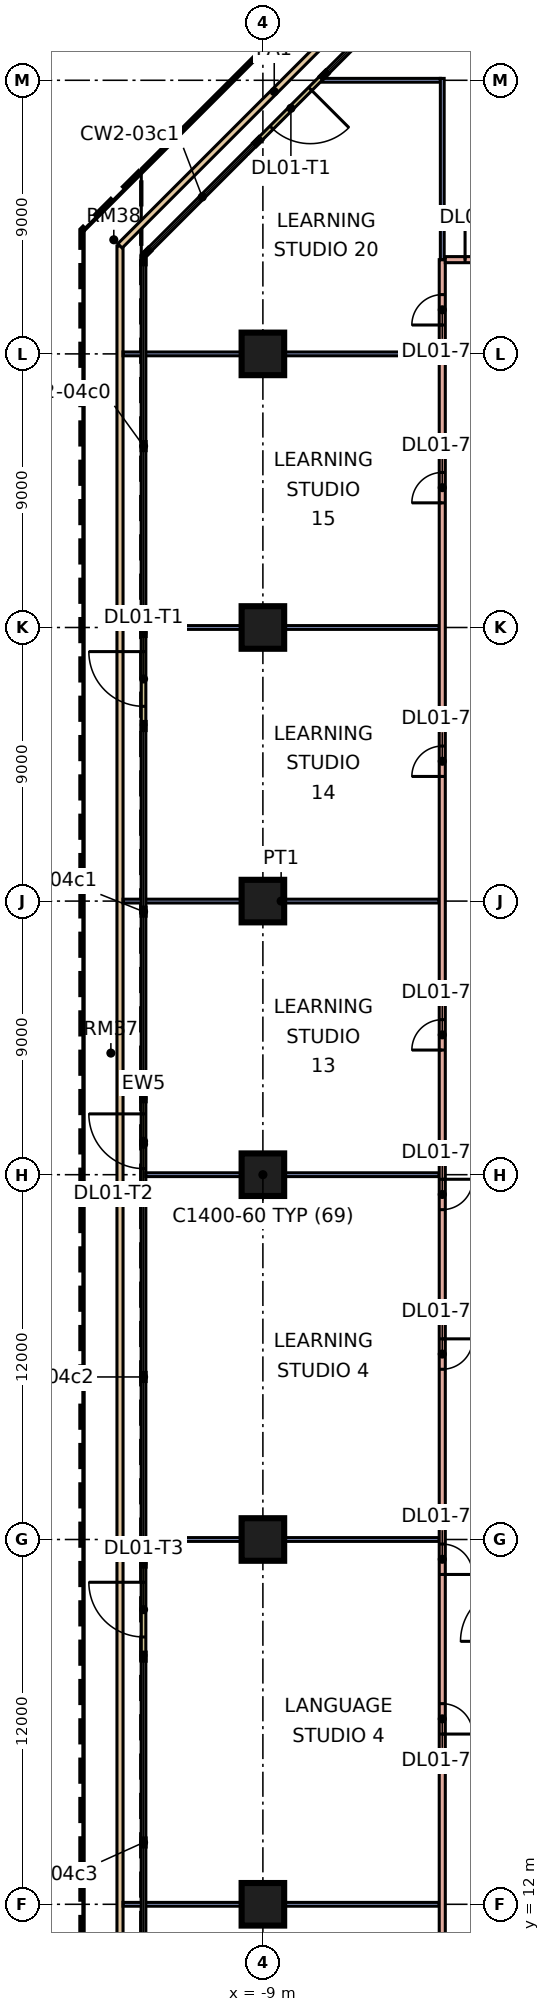
"""IFC4 building model, lengths in metres.
Left out: names, types, materials, properties, quantities, classifications, styles, units other than length and angle.
Written with IfcOpenShell. Run it as: python <this file> out.ifc"""

import sys

from ifc_helpers import new_model, si_unit, direction, frame, frame_2d, origin, origin_2d, place, context, subcontext, project, spatial, rectangle, extrude, element, fill, save


model = new_model("IFC4")
c1 = context("Model", 3, precision=1e-05, world=origin(), true_north=direction((0.0, 1.0)))
c2 = subcontext(c1, "Body", "Model", "MODEL_VIEW")
j1 = project(units=[si_unit("LENGTHUNIT", "METRE"), si_unit("PLANEANGLEUNIT", "RADIAN")], contexts=[c1])
p1 = place(None, origin())
s1 = spatial("IfcSite", under=j1, at=p1, CompositionType="ELEMENT")
p2 = place(p1, origin())
s2 = spatial("IfcBuilding", under=s1, at=p2, CompositionType="ELEMENT")
p3 = place(p2, frame((0.0, 0.0, 7.2)))
s3 = spatial("IfcBuildingStorey", under=s2, at=p3, CompositionType="ELEMENT", Elevation=7.2)
for number, where, z_axis, x_axis in (
    (1, (-9.0, 12.0, 0.0), (0.0, 0.0, 1.0), (1.0, 0.0, 0.0)),
    (2, (-9.0, 24.0, 0.0), (0.0, 0.0, 1.0), (1.0, 0.0, 0.0)),
    (3, (-9.0, 36.0, 0.0), (0.0, 0.0, 1.0), (1.0, 0.0, 0.0)),
    (4, (-9.0, 45.0, 0.0), (0.0, 0.0, 1.0), (1.0, 0.0, 0.0)),
    (5, (-9.0, 54.0, 0.0), (0.0, 0.0, 1.0), (1.0, 0.0, 0.0)),
    (6, (-9.0, 63.0, 0.0), (0.0, 0.0, 1.0), (1.0, 0.0, 0.0)),
):
    element("IfcColumn", number, at=place(p3, frame(where, z_axis=z_axis, x_axis=x_axis)), inside=s3, PredefinedType="COLUMN", context=c2, shape_type="SweptSolid", body=[
        extrude(rectangle(XDim=1.4, YDim=1.4, at=origin_2d()), origin(), (0.0, 0.0, 1.0), 4.8),
    ])
p4 = place(p3, frame((-7.018, 72.139, 0.0), z_axis=(0.0, 0.0, 1.0), x_axis=(-0.707106781187, -0.707106781187, 0.0)))
e7 = element("IfcWall", 7, at=p4, inside=s3, PredefinedType="SOLIDWALL", context=c2, shape_type="SweptSolid", body=[
    extrude(rectangle(XDim=3.0, YDim=0.15, at=frame_2d((1.5, 0.0))), origin(), (0.0, 0.0, 1.0), 4.4),
])
p5 = place(p4, frame((0.6, 0.0, 0.0)))
e8 = element("IfcOpeningElement", 8, at=p5, cuts=e7, PredefinedType="OPENING", context=c2, shape_type="SweptSolid", body=[
    extrude(rectangle(XDim=1.8, YDim=2.4, at=frame_2d((0.9, 1.2))), frame((0.0, 0.085, 0.0), z_axis=(0.0, -1.0, 0.0), x_axis=(1.0, 0.0, 0.0)), (0.0, 0.0, 1.0), 0.17),
])
p6 = place(p3, frame((-12.925, 53.807, 0.0), z_axis=(0.0, 0.0, 1.0), x_axis=(0.0, -1.0, 0.0)))
e9 = element("IfcWall", 9, at=p6, inside=s3, PredefinedType="SOLIDWALL", context=c2, shape_type="SweptSolid", body=[
    extrude(rectangle(XDim=3.0, YDim=0.15, at=frame_2d((1.5, 0.0))), origin(), (0.0, 0.0, 1.0), 4.4),
])
p7 = place(p6, frame((0.6, 0.0, 0.0)))
e10 = element("IfcOpeningElement", 10, at=p7, cuts=e9, PredefinedType="OPENING", context=c2, shape_type="SweptSolid", body=[
    extrude(rectangle(XDim=1.8, YDim=2.4, at=frame_2d((0.9, 1.2))), frame((0.0, 0.085, 0.0), z_axis=(0.0, -1.0, 0.0), x_axis=(1.0, 0.0, 0.0)), (0.0, 0.0, 1.0), 0.17),
])
p8 = place(p3, frame((-12.925, 38.5, 0.0), z_axis=(0.0, 0.0, 1.0), x_axis=(0.0, -1.0, 0.0)))
e11 = element("IfcWall", 11, at=p8, inside=s3, PredefinedType="SOLIDWALL", context=c2, shape_type="SweptSolid", body=[
    extrude(rectangle(XDim=3.0, YDim=0.15, at=frame_2d((1.5, 0.0))), origin(), (0.0, 0.0, 1.0), 4.4),
])
p9 = place(p8, frame((0.5, 0.0, 0.0)))
e12 = element("IfcOpeningElement", 12, at=p9, cuts=e11, PredefinedType="OPENING", context=c2, shape_type="SweptSolid", body=[
    extrude(rectangle(XDim=1.8, YDim=2.4, at=frame_2d((0.9, 1.2))), frame((0.0, 0.085, 0.0), z_axis=(0.0, -1.0, 0.0), x_axis=(1.0, 0.0, 0.0)), (0.0, 0.0, 1.0), 0.17),
])
p10 = place(p3, frame((-12.925, 23.193, 0.0), z_axis=(0.0, 0.0, 1.0), x_axis=(0.0, -1.0, 0.0)))
e13 = element("IfcWall", 13, at=p10, inside=s3, PredefinedType="SOLIDWALL", context=c2, shape_type="SweptSolid", body=[
    extrude(rectangle(XDim=3.0, YDim=0.15, at=frame_2d((1.5, 0.0))), origin(), (0.0, 0.0, 1.0), 4.4),
])
p11 = place(p10, frame((0.6, 0.0, 0.0)))
e14 = element("IfcOpeningElement", 14, at=p11, cuts=e13, PredefinedType="OPENING", context=c2, shape_type="SweptSolid", body=[
    extrude(rectangle(XDim=1.8, YDim=2.4, at=frame_2d((0.9, 1.2))), frame((0.0, 0.085, 0.0), z_axis=(0.0, -1.0, 0.0), x_axis=(1.0, 0.0, 0.0)), (0.0, 0.0, 1.0), 0.17),
])
p12 = place(p3, frame((-13.7, 7.447, 0.0), z_axis=(0.0, 0.0, 1.0), x_axis=(0.0, 1.0, 0.0)))
e15 = element("IfcWall", 15, at=p12, inside=s3, PredefinedType="PARAPET", context=c2, shape_type="SweptSolid", body=[
    extrude(rectangle(XDim=59.107, YDim=0.2, at=frame_2d((29.553, 0.0))), origin(), (0.0, 0.0, 1.0), 0.5),
])
p13 = place(p3, frame((-13.7, 66.553, 0.0), z_axis=(0.0, 0.0, 1.0), x_axis=(0.707106781187, 0.707106781187, 0.0)))
e16 = element("IfcWall", 16, at=p13, inside=s3, PredefinedType="PARAPET", context=c2, shape_type="SweptSolid", body=[
    extrude(rectangle(XDim=14.349, YDim=0.2, at=frame_2d((7.175, 0.0))), origin(), (0.0, 0.0, 1.0), 0.5),
])
for number, where, z_axis, x_axis in (
    (17, (-13.6, 12.0, 0.0), (0.0, 0.0, 1.0), (1.0, 0.0, 0.0)),
    (18, (-13.6, 24.0, 0.0), (0.0, 0.0, 1.0), (1.0, 0.0, 0.0)),
    (19, (-13.6, 45.0, 0.0), (0.0, 0.0, 1.0), (1.0, 0.0, 0.0)),
):
    element("IfcWall", number, at=place(p3, frame(where, z_axis=z_axis, x_axis=x_axis)), inside=s3, PredefinedType="PARTITIONING", context=c2, shape_type="SweptSolid", body=[
        extrude(rectangle(XDim=10.4, YDim=0.125, at=frame_2d((5.2, 0.0))), origin(), (0.0, 0.0, 1.0), 4.4),
    ])
p14 = place(p3, frame((-12.925, 54.0, 0.0), z_axis=(0.0, 0.0, 1.0), x_axis=(1.0, 0.0, 0.0)))
e20 = element("IfcWall", 20, at=p14, inside=s3, PredefinedType="PARTITIONING", context=c2, shape_type="SweptSolid", body=[
    extrude(rectangle(XDim=9.725, YDim=0.125, at=frame_2d((4.863, 0.0))), origin(), (0.0, 0.0, 1.0), 4.4),
])
p15 = place(p3, frame((-13.6, 63.0, 0.0), z_axis=(0.0, 0.0, 1.0), x_axis=(1.0, 0.0, 0.0)))
e21 = element("IfcWall", 21, at=p15, inside=s3, PredefinedType="PARTITIONING", context=c2, shape_type="SweptSolid", body=[
    extrude(rectangle(XDim=10.4, YDim=0.125, at=frame_2d((5.2, 0.0))), origin(), (0.0, 0.0, 1.0), 4.4),
])
p16 = place(p3, frame((-12.851, 36.0, 0.0), z_axis=(0.0, 0.0, 1.0), x_axis=(1.0, 0.0, 0.0)))
e22 = element("IfcWall", 22, at=p16, inside=s3, PredefinedType="PARTITIONING", context=c2, shape_type="SweptSolid", body=[
    extrude(rectangle(XDim=9.651, YDim=0.125, at=frame_2d((4.826, 0.0))), origin(), (0.0, 0.0, 1.0), 4.4),
])
p17 = place(p3, frame((-7.053, 72.0, 0.0), z_axis=(0.0, 0.0, 1.0), x_axis=(1.0, 0.0, 0.0)))
e23 = element("IfcWall", 23, at=p17, inside=s3, PredefinedType="PARTITIONING", context=c2, shape_type="SweptSolid", body=[
    extrude(rectangle(XDim=3.891, YDim=0.125, at=frame_2d((1.945, 0.0))), origin(), (0.0, 0.0, 1.0), 4.4),
])
p18 = place(p3, frame((-3.1, -1.953, 0.0), z_axis=(0.0, 0.0, 1.0), x_axis=(0.0, 1.0, 0.0)))
e24 = element("IfcWall", 24, at=p18, inside=s3, PredefinedType="PARTITIONING", context=c2, shape_type="SweptSolid", body=[
    extrude(rectangle(XDim=68.053, YDim=0.2, at=frame_2d((34.026, 0.0))), origin(), (0.0, 0.0, 1.0), 4.4),
])
p19 = place(p18, frame((7.553, 0.0, 0.0)))
e25 = element("IfcOpeningElement", 25, at=p19, cuts=e24, PredefinedType="OPENING", context=c2, shape_type="SweptSolid", body=[
    extrude(rectangle(XDim=1.0, YDim=2.1, at=frame_2d((0.5, 1.05))), frame((0.0, 0.11, 0.0), z_axis=(0.0, -1.0, 0.0), x_axis=(1.0, 0.0, 0.0)), (0.0, 0.0, 1.0), 0.22),
])
p20 = place(p18, frame((19.553, 0.0, 0.0)))
e26 = element("IfcOpeningElement", 26, at=p20, cuts=e24, PredefinedType="OPENING", context=c2, shape_type="SweptSolid", body=[
    extrude(rectangle(XDim=1.0, YDim=2.1, at=frame_2d((0.5, 1.05))), frame((0.0, 0.11, 0.0), z_axis=(0.0, -1.0, 0.0), x_axis=(1.0, 0.0, 0.0)), (0.0, 0.0, 1.0), 0.22),
])
p21 = place(p18, frame((24.803, 0.0, 0.0)))
e27 = element("IfcOpeningElement", 27, at=p21, cuts=e24, PredefinedType="OPENING", context=c2, shape_type="SweptSolid", body=[
    extrude(rectangle(XDim=1.0, YDim=2.1, at=frame_2d((0.5, 1.05))), frame((0.0, 0.11, 0.0), z_axis=(0.0, -1.0, 0.0), x_axis=(1.0, 0.0, 0.0)), (0.0, 0.0, 1.0), 0.22),
])
p22 = place(p18, frame((31.553, 0.0, 0.0)))
e28 = element("IfcOpeningElement", 28, at=p22, cuts=e24, PredefinedType="OPENING", context=c2, shape_type="SweptSolid", body=[
    extrude(rectangle(XDim=1.0, YDim=2.1, at=frame_2d((0.5, 1.05))), frame((0.0, 0.11, 0.0), z_axis=(0.0, -1.0, 0.0), x_axis=(1.0, 0.0, 0.0)), (0.0, 0.0, 1.0), 0.22),
])
p23 = place(p18, frame((36.803, 0.0, 0.0)))
e29 = element("IfcOpeningElement", 29, at=p23, cuts=e24, PredefinedType="OPENING", context=c2, shape_type="SweptSolid", body=[
    extrude(rectangle(XDim=1.0, YDim=2.1, at=frame_2d((0.5, 1.05))), frame((0.0, 0.11, 0.0), z_axis=(0.0, -1.0, 0.0), x_axis=(1.0, 0.0, 0.0)), (0.0, 0.0, 1.0), 0.22),
])
p24 = place(p18, frame((42.053, 0.0, 0.0)))
e30 = element("IfcOpeningElement", 30, at=p24, cuts=e24, PredefinedType="OPENING", context=c2, shape_type="SweptSolid", body=[
    extrude(rectangle(XDim=1.0, YDim=2.1, at=frame_2d((0.5, 1.05))), frame((0.0, 0.11, 0.0), z_axis=(0.0, -1.0, 0.0), x_axis=(1.0, 0.0, 0.0)), (0.0, 0.0, 1.0), 0.22),
])
p25 = place(p18, frame((51.053, 0.0, 0.0)))
e31 = element("IfcOpeningElement", 31, at=p25, cuts=e24, PredefinedType="OPENING", context=c2, shape_type="SweptSolid", body=[
    extrude(rectangle(XDim=1.0, YDim=2.1, at=frame_2d((0.5, 1.05))), frame((0.0, 0.11, 0.0), z_axis=(0.0, -1.0, 0.0), x_axis=(1.0, 0.0, 0.0)), (0.0, 0.0, 1.0), 0.22),
])
p26 = place(p18, frame((60.053, 0.0, 0.0)))
e32 = element("IfcOpeningElement", 32, at=p26, cuts=e24, PredefinedType="OPENING", context=c2, shape_type="SweptSolid", body=[
    extrude(rectangle(XDim=1.0, YDim=2.1, at=frame_2d((0.5, 1.05))), frame((0.0, 0.11, 0.0), z_axis=(0.0, -1.0, 0.0), x_axis=(1.0, 0.0, 0.0)), (0.0, 0.0, 1.0), 0.22),
])
p27 = place(p18, frame((65.903, 0.0, 0.0)))
e33 = element("IfcOpeningElement", 33, at=p27, cuts=e24, PredefinedType="OPENING", context=c2, shape_type="SweptSolid", body=[
    extrude(rectangle(XDim=1.0, YDim=2.1, at=frame_2d((0.5, 1.05))), frame((0.0, 0.11, 0.0), z_axis=(0.0, -1.0, 0.0), x_axis=(1.0, 0.0, 0.0)), (0.0, 0.0, 1.0), 0.22),
])
p28 = place(p3, frame((-3.1, 66.1, 0.0), z_axis=(0.0, 0.0, 1.0), x_axis=(0.0, 1.0, 0.0)))
e34 = element("IfcWall", 34, at=p28, inside=s3, PredefinedType="PARTITIONING", context=c2, shape_type="SweptSolid", body=[
    extrude(rectangle(XDim=5.962, YDim=0.125, at=frame_2d((2.981, 0.0))), origin(), (0.0, 0.0, 1.0), 4.4),
])
p29 = place(p3, frame((-3.0, 66.1, 0.0), z_axis=(0.0, 0.0, 1.0), x_axis=(1.0, 0.0, 0.0)))
e35 = element("IfcWall", 35, at=p29, inside=s3, PredefinedType="PARTITIONING", context=c2, shape_type="SweptSolid", body=[
    extrude(rectangle(XDim=30.0, YDim=0.2, at=frame_2d((15.0, 0.0))), origin(), (0.0, 0.0, 1.0), 4.4),
])
p30 = place(p29, frame((0.65, 0.0, 0.0)))
e36 = element("IfcOpeningElement", 36, at=p30, cuts=e35, PredefinedType="OPENING", context=c2, shape_type="SweptSolid", body=[
    extrude(rectangle(XDim=1.0, YDim=2.1, at=frame_2d((0.5, 1.05))), frame((0.0, 0.11, 0.0), z_axis=(0.0, -1.0, 0.0), x_axis=(1.0, 0.0, 0.0)), (0.0, 0.0, 1.0), 0.22),
])
p31 = place(p29, frame((8.6, 0.0, 0.0)))
e37 = element("IfcOpeningElement", 37, at=p31, cuts=e35, PredefinedType="OPENING", context=c2, shape_type="SweptSolid", body=[
    extrude(rectangle(XDim=1.0, YDim=2.1, at=frame_2d((0.5, 1.05))), frame((0.0, 0.11, 0.0), z_axis=(0.0, -1.0, 0.0), x_axis=(1.0, 0.0, 0.0)), (0.0, 0.0, 1.0), 0.22),
])
p32 = place(p29, frame((13.85, 0.0, 0.0)))
e38 = element("IfcOpeningElement", 38, at=p32, cuts=e35, PredefinedType="OPENING", context=c2, shape_type="SweptSolid", body=[
    extrude(rectangle(XDim=1.0, YDim=2.1, at=frame_2d((0.5, 1.05))), frame((0.0, 0.11, 0.0), z_axis=(0.0, -1.0, 0.0), x_axis=(1.0, 0.0, 0.0)), (0.0, 0.0, 1.0), 0.22),
])
p33 = place(p29, frame((22.35, 0.0, 0.0)))
e39 = element("IfcOpeningElement", 39, at=p33, cuts=e35, PredefinedType="OPENING", context=c2, shape_type="SweptSolid", body=[
    extrude(rectangle(XDim=1.0, YDim=2.1, at=frame_2d((0.5, 1.05))), frame((0.0, 0.11, 0.0), z_axis=(0.0, -1.0, 0.0), x_axis=(1.0, 0.0, 0.0)), (0.0, 0.0, 1.0), 0.22),
])
p34 = place(p29, frame((25.85, 0.0, 0.0)))
e40 = element("IfcOpeningElement", 40, at=p34, cuts=e35, PredefinedType="OPENING", context=c2, shape_type="SweptSolid", body=[
    extrude(rectangle(XDim=1.0, YDim=2.1, at=frame_2d((0.5, 1.05))), frame((0.0, 0.11, 0.0), z_axis=(0.0, -1.0, 0.0), x_axis=(1.0, 0.0, 0.0)), (0.0, 0.0, 1.0), 0.22),
])
p35 = place(p29, frame((28.45, 0.0, 0.0)))
e41 = element("IfcOpeningElement", 41, at=p35, cuts=e35, PredefinedType="OPENING", context=c2, shape_type="SweptSolid", body=[
    extrude(rectangle(XDim=1.0, YDim=2.1, at=frame_2d((0.5, 1.05))), frame((0.0, 0.11, 0.0), z_axis=(0.0, -1.0, 0.0), x_axis=(1.0, 0.0, 0.0)), (0.0, 0.0, 1.0), 0.22),
])
p36 = place(p5, origin())
e42 = element("IfcDoor", 42, at=p36, inside=s3, OperationType="DOUBLE_DOOR_SINGLE_SWING", PredefinedType="DOOR", context=c2, shape_type="SweptSolid", body=[
    extrude(rectangle(XDim=1.8, YDim=2.4, at=frame_2d((0.9, 1.2))), frame((0.0, 0.025, 0.0), z_axis=(0.0, -1.0, 0.0), x_axis=(1.0, 0.0, 0.0)), (0.0, 0.0, 1.0), 0.05),
])
fill(e8, e42)
p37 = place(p7, frame((1.8, 0.0, 0.0), z_axis=(0.0, 0.0, 1.0), x_axis=(-1.0, 0.0, 0.0)))
e43 = element("IfcDoor", 43, at=p37, inside=s3, OperationType="DOUBLE_DOOR_SINGLE_SWING", PredefinedType="DOOR", context=c2, shape_type="SweptSolid", body=[
    extrude(rectangle(XDim=1.8, YDim=2.4, at=frame_2d((0.9, 1.2))), frame((0.0, 0.025, 0.0), z_axis=(0.0, -1.0, 0.0), x_axis=(1.0, 0.0, 0.0)), (0.0, 0.0, 1.0), 0.05),
])
fill(e10, e43)
p38 = place(p9, frame((1.8, 0.0, 0.0), z_axis=(0.0, 0.0, 1.0), x_axis=(-1.0, 0.0, 0.0)))
e44 = element("IfcDoor", 44, at=p38, inside=s3, OperationType="DOUBLE_DOOR_SINGLE_SWING", PredefinedType="DOOR", context=c2, shape_type="SweptSolid", body=[
    extrude(rectangle(XDim=1.8, YDim=2.4, at=frame_2d((0.9, 1.2))), frame((0.0, 0.025, 0.0), z_axis=(0.0, -1.0, 0.0), x_axis=(1.0, 0.0, 0.0)), (0.0, 0.0, 1.0), 0.05),
])
fill(e12, e44)
p39 = place(p11, frame((1.8, 0.0, 0.0), z_axis=(0.0, 0.0, 1.0), x_axis=(-1.0, 0.0, 0.0)))
e45 = element("IfcDoor", 45, at=p39, inside=s3, OperationType="DOUBLE_DOOR_SINGLE_SWING", PredefinedType="DOOR", context=c2, shape_type="SweptSolid", body=[
    extrude(rectangle(XDim=1.8, YDim=2.4, at=frame_2d((0.9, 1.2))), frame((0.0, 0.025, 0.0), z_axis=(0.0, -1.0, 0.0), x_axis=(1.0, 0.0, 0.0)), (0.0, 0.0, 1.0), 0.05),
])
fill(e14, e45)
p40 = place(p30, origin())
e46 = element("IfcDoor", 46, at=p40, inside=s3, OperationType="SINGLE_SWING_LEFT", PredefinedType="DOOR", context=c2, shape_type="SweptSolid", body=[
    extrude(rectangle(XDim=1.0, YDim=2.1, at=frame_2d((0.5, 1.05))), frame((0.0, 0.025, 0.0), z_axis=(0.0, -1.0, 0.0), x_axis=(1.0, 0.0, 0.0)), (0.0, 0.0, 1.0), 0.05),
])
fill(e36, e46)
p41 = place(p20, frame((1.0, 0.0, 0.0), z_axis=(0.0, 0.0, 1.0), x_axis=(-1.0, 0.0, 0.0)))
e47 = element("IfcDoor", 47, at=p41, inside=s3, OperationType="SINGLE_SWING_LEFT", PredefinedType="DOOR", context=c2, shape_type="SweptSolid", body=[
    extrude(rectangle(XDim=1.0, YDim=2.1, at=frame_2d((0.5, 1.05))), frame((0.0, 0.025, 0.0), z_axis=(0.0, -1.0, 0.0), x_axis=(1.0, 0.0, 0.0)), (0.0, 0.0, 1.0), 0.05),
])
fill(e26, e47)
p42 = place(p21, frame((1.0, 0.0, 0.0), z_axis=(0.0, 0.0, 1.0), x_axis=(-1.0, 0.0, 0.0)))
e48 = element("IfcDoor", 48, at=p42, inside=s3, OperationType="SINGLE_SWING_LEFT", PredefinedType="DOOR", context=c2, shape_type="SweptSolid", body=[
    extrude(rectangle(XDim=1.0, YDim=2.1, at=frame_2d((0.5, 1.05))), frame((0.0, 0.025, 0.0), z_axis=(0.0, -1.0, 0.0), x_axis=(1.0, 0.0, 0.0)), (0.0, 0.0, 1.0), 0.05),
])
fill(e27, e48)
p43 = place(p22, origin())
e49 = element("IfcDoor", 49, at=p43, inside=s3, OperationType="SINGLE_SWING_RIGHT", PredefinedType="DOOR", context=c2, shape_type="SweptSolid", body=[
    extrude(rectangle(XDim=1.0, YDim=2.1, at=frame_2d((0.5, 1.05))), frame((0.0, 0.025, 0.0), z_axis=(0.0, -1.0, 0.0), x_axis=(1.0, 0.0, 0.0)), (0.0, 0.0, 1.0), 0.05),
])
fill(e28, e49)
p44 = place(p23, origin())
e50 = element("IfcDoor", 50, at=p44, inside=s3, OperationType="SINGLE_SWING_RIGHT", PredefinedType="DOOR", context=c2, shape_type="SweptSolid", body=[
    extrude(rectangle(XDim=1.0, YDim=2.1, at=frame_2d((0.5, 1.05))), frame((0.0, 0.025, 0.0), z_axis=(0.0, -1.0, 0.0), x_axis=(1.0, 0.0, 0.0)), (0.0, 0.0, 1.0), 0.05),
])
fill(e29, e50)
p45 = place(p24, origin())
e51 = element("IfcDoor", 51, at=p45, inside=s3, OperationType="SINGLE_SWING_LEFT", PredefinedType="DOOR", context=c2, shape_type="SweptSolid", body=[
    extrude(rectangle(XDim=1.0, YDim=2.1, at=frame_2d((0.5, 1.05))), frame((0.0, 0.025, 0.0), z_axis=(0.0, -1.0, 0.0), x_axis=(1.0, 0.0, 0.0)), (0.0, 0.0, 1.0), 0.05),
])
fill(e30, e51)
p46 = place(p25, origin())
e52 = element("IfcDoor", 52, at=p46, inside=s3, OperationType="SINGLE_SWING_LEFT", PredefinedType="DOOR", context=c2, shape_type="SweptSolid", body=[
    extrude(rectangle(XDim=1.0, YDim=2.1, at=frame_2d((0.5, 1.05))), frame((0.0, 0.025, 0.0), z_axis=(0.0, -1.0, 0.0), x_axis=(1.0, 0.0, 0.0)), (0.0, 0.0, 1.0), 0.05),
])
fill(e31, e52)
p47 = place(p26, origin())
e53 = element("IfcDoor", 53, at=p47, inside=s3, OperationType="SINGLE_SWING_LEFT", PredefinedType="DOOR", context=c2, shape_type="SweptSolid", body=[
    extrude(rectangle(XDim=1.0, YDim=2.1, at=frame_2d((0.5, 1.05))), frame((0.0, 0.025, 0.0), z_axis=(0.0, -1.0, 0.0), x_axis=(1.0, 0.0, 0.0)), (0.0, 0.0, 1.0), 0.05),
])
fill(e32, e53)
p48 = place(p27, origin())
e54 = element("IfcDoor", 54, at=p48, inside=s3, OperationType="SINGLE_SWING_LEFT", PredefinedType="DOOR", context=c2, shape_type="SweptSolid", body=[
    extrude(rectangle(XDim=1.0, YDim=2.1, at=frame_2d((0.5, 1.05))), frame((0.0, 0.025, 0.0), z_axis=(0.0, -1.0, 0.0), x_axis=(1.0, 0.0, 0.0)), (0.0, 0.0, 1.0), 0.05),
])
fill(e33, e54)
save(model, sys.argv[1])
